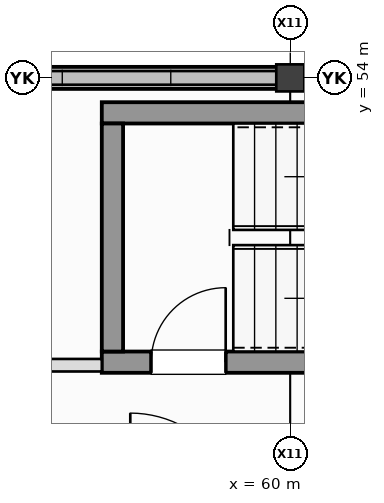
"""IFC4 building model, lengths in metres.
Left out: names, types, materials, properties, quantities, classifications, styles, units other than length and angle.
Written with IfcOpenShell. Run it as: python <this file> out.ifc"""

import sys

from ifc_helpers import new_model, si_unit, direction, frame, frame_2d, origin, origin_2d, place, context, subcontext, project, spatial, rectangle, i_section, extrude, element, fill, save


model = new_model("IFC4")
c1 = context("Model", 3, precision=1e-05, world=origin(), true_north=direction((0.0, 1.0)))
c2 = subcontext(c1, "Body", "Model", "MODEL_VIEW")
j1 = project(units=[si_unit("LENGTHUNIT", "METRE"), si_unit("PLANEANGLEUNIT", "RADIAN")], contexts=[c1])
p1 = place(None, origin())
s1 = spatial("IfcSite", under=j1, at=p1, CompositionType="ELEMENT")
p2 = place(p1, origin())
s2 = spatial("IfcBuilding", under=s1, at=p2, CompositionType="ELEMENT")
p3 = place(p2, origin())
s3 = spatial("IfcBuildingStorey", under=s2, at=p3, CompositionType="ELEMENT", Elevation=0.0)
p4 = place(p3, frame((60.0, 54.0, -0.41), z_axis=(0.0, 0.0, 1.0), x_axis=(1.0, 0.0, 0.0)))
e1 = element("IfcColumn", 1, at=p4, inside=s3, PredefinedType="COLUMN", context=c2, shape_type="SweptSolid", body=[
    extrude(i_section(OverallWidth=0.369, OverallDepth=0.356, WebThickness=0.011, FlangeThickness=0.018, at=origin_2d()), origin(), (0.0, 0.0, 1.0), 6.41),
])
p5 = place(p3, frame((59.855, 54.0, 0.0), z_axis=(0.0, 0.0, 1.0), x_axis=(-1.0, 0.0, 0.0)))
e2 = element("IfcWall", 2, at=p5, inside=s3, PredefinedType="STANDARD", context=c2, shape_type="SweptSolid", body=[
    extrude(rectangle(XDim=5.71, YDim=0.29, at=frame_2d((2.855, 0.0))), origin(), (0.0, 0.0, 1.0), 0.8),
])
p6 = place(p3, frame((65.855, 54.0, 0.0), z_axis=(0.0, 0.0, 1.0), x_axis=(-1.0, 0.0, 0.0)))
e3 = element("IfcWall", 3, at=p6, inside=s3, PredefinedType="STANDARD", context=c2, shape_type="SweptSolid", body=[
    extrude(rectangle(XDim=5.71, YDim=0.29, at=frame_2d((2.855, 0.0))), origin(), (0.0, 0.0, 1.0), 0.92),
])
p7 = place(p3, frame((57.52, 50.26, 0.0), z_axis=(0.0, 0.0, 1.0), x_axis=(1.0, 0.0, 0.0)))
e4 = element("IfcWall", 4, at=p7, inside=s3, PredefinedType="SHEAR", context=c2, shape_type="SweptSolid", body=[
    extrude(rectangle(XDim=8.16, YDim=0.28, at=frame_2d((4.08, 0.0))), origin(), (0.0, 0.0, 1.0), 6.0),
])
p8 = place(p7, frame((0.65, 0.0, 0.0)))
e5 = element("IfcOpeningElement", 5, at=p8, cuts=e4, PredefinedType="OPENING", context=c2, shape_type="SweptSolid", body=[
    extrude(rectangle(XDim=0.98, YDim=2.15, at=frame_2d((0.49, 1.075))), frame((0.0, 0.15, 0.0), z_axis=(0.0, -1.0, 0.0), x_axis=(1.0, 0.0, 0.0)), (0.0, 0.0, 1.0), 0.3),
])
p9 = place(p3, frame((65.68, 53.54, 0.0), z_axis=(0.0, 0.0, 1.0), x_axis=(-1.0, 0.0, 0.0)))
e6 = element("IfcWall", 6, at=p9, inside=s3, PredefinedType="SHEAR", context=c2, shape_type="SweptSolid", body=[
    extrude(rectangle(XDim=8.16, YDim=0.28, at=frame_2d((4.08, 0.0))), origin(), (0.0, 0.0, 1.0), 6.0),
])
p10 = place(p3, frame((57.66, 53.4, 0.0), z_axis=(0.0, 0.0, 1.0), x_axis=(0.0, -1.0, 0.0)))
e7 = element("IfcWall", 7, at=p10, inside=s3, PredefinedType="SHEAR", context=c2, shape_type="SweptSolid", body=[
    extrude(rectangle(XDim=3.0, YDim=0.28, at=frame_2d((1.5, 0.0))), origin(), (0.0, 0.0, 1.0), 6.0),
])
p11 = place(p3, frame((57.52, 50.22, 0.0), z_axis=(0.0, 0.0, 1.0), x_axis=(-1.0, 0.0, 0.0)))
e8 = element("IfcWall", 8, at=p11, inside=s3, PredefinedType="PARTITIONING", context=c2, shape_type="SweptSolid", body=[
    extrude(rectangle(XDim=7.04, YDim=0.165, at=frame_2d((3.52, 0.0))), origin(), (0.0, 0.0, 1.0), 5.68),
])
p12 = place(p11, frame((3.065, 0.0, 0.0)))
e9 = element("IfcOpeningElement", 9, at=p12, cuts=e8, PredefinedType="OPENING", context=c2, shape_type="SweptSolid", body=[
    extrude(rectangle(XDim=0.91, YDim=2.1, at=frame_2d((0.455, 1.05))), frame((0.0, 0.093, 0.0), z_axis=(0.0, -1.0, 0.0), x_axis=(1.0, 0.0, 0.0)), (0.0, 0.0, 1.0), 0.185),
])
p13 = place(p8, origin())
e10 = element("IfcDoor", 10, at=p13, inside=s3, OperationType="SINGLE_SWING_RIGHT", PredefinedType="DOOR", context=c2, shape_type="SweptSolid", body=[
    extrude(rectangle(XDim=0.98, YDim=2.15, at=frame_2d((0.49, 1.075))), frame((0.0, 0.025, 0.0), z_axis=(0.0, -1.0, 0.0), x_axis=(1.0, 0.0, 0.0)), (0.0, 0.0, 1.0), 0.05),
])
fill(e5, e10)
save(model, sys.argv[1])
